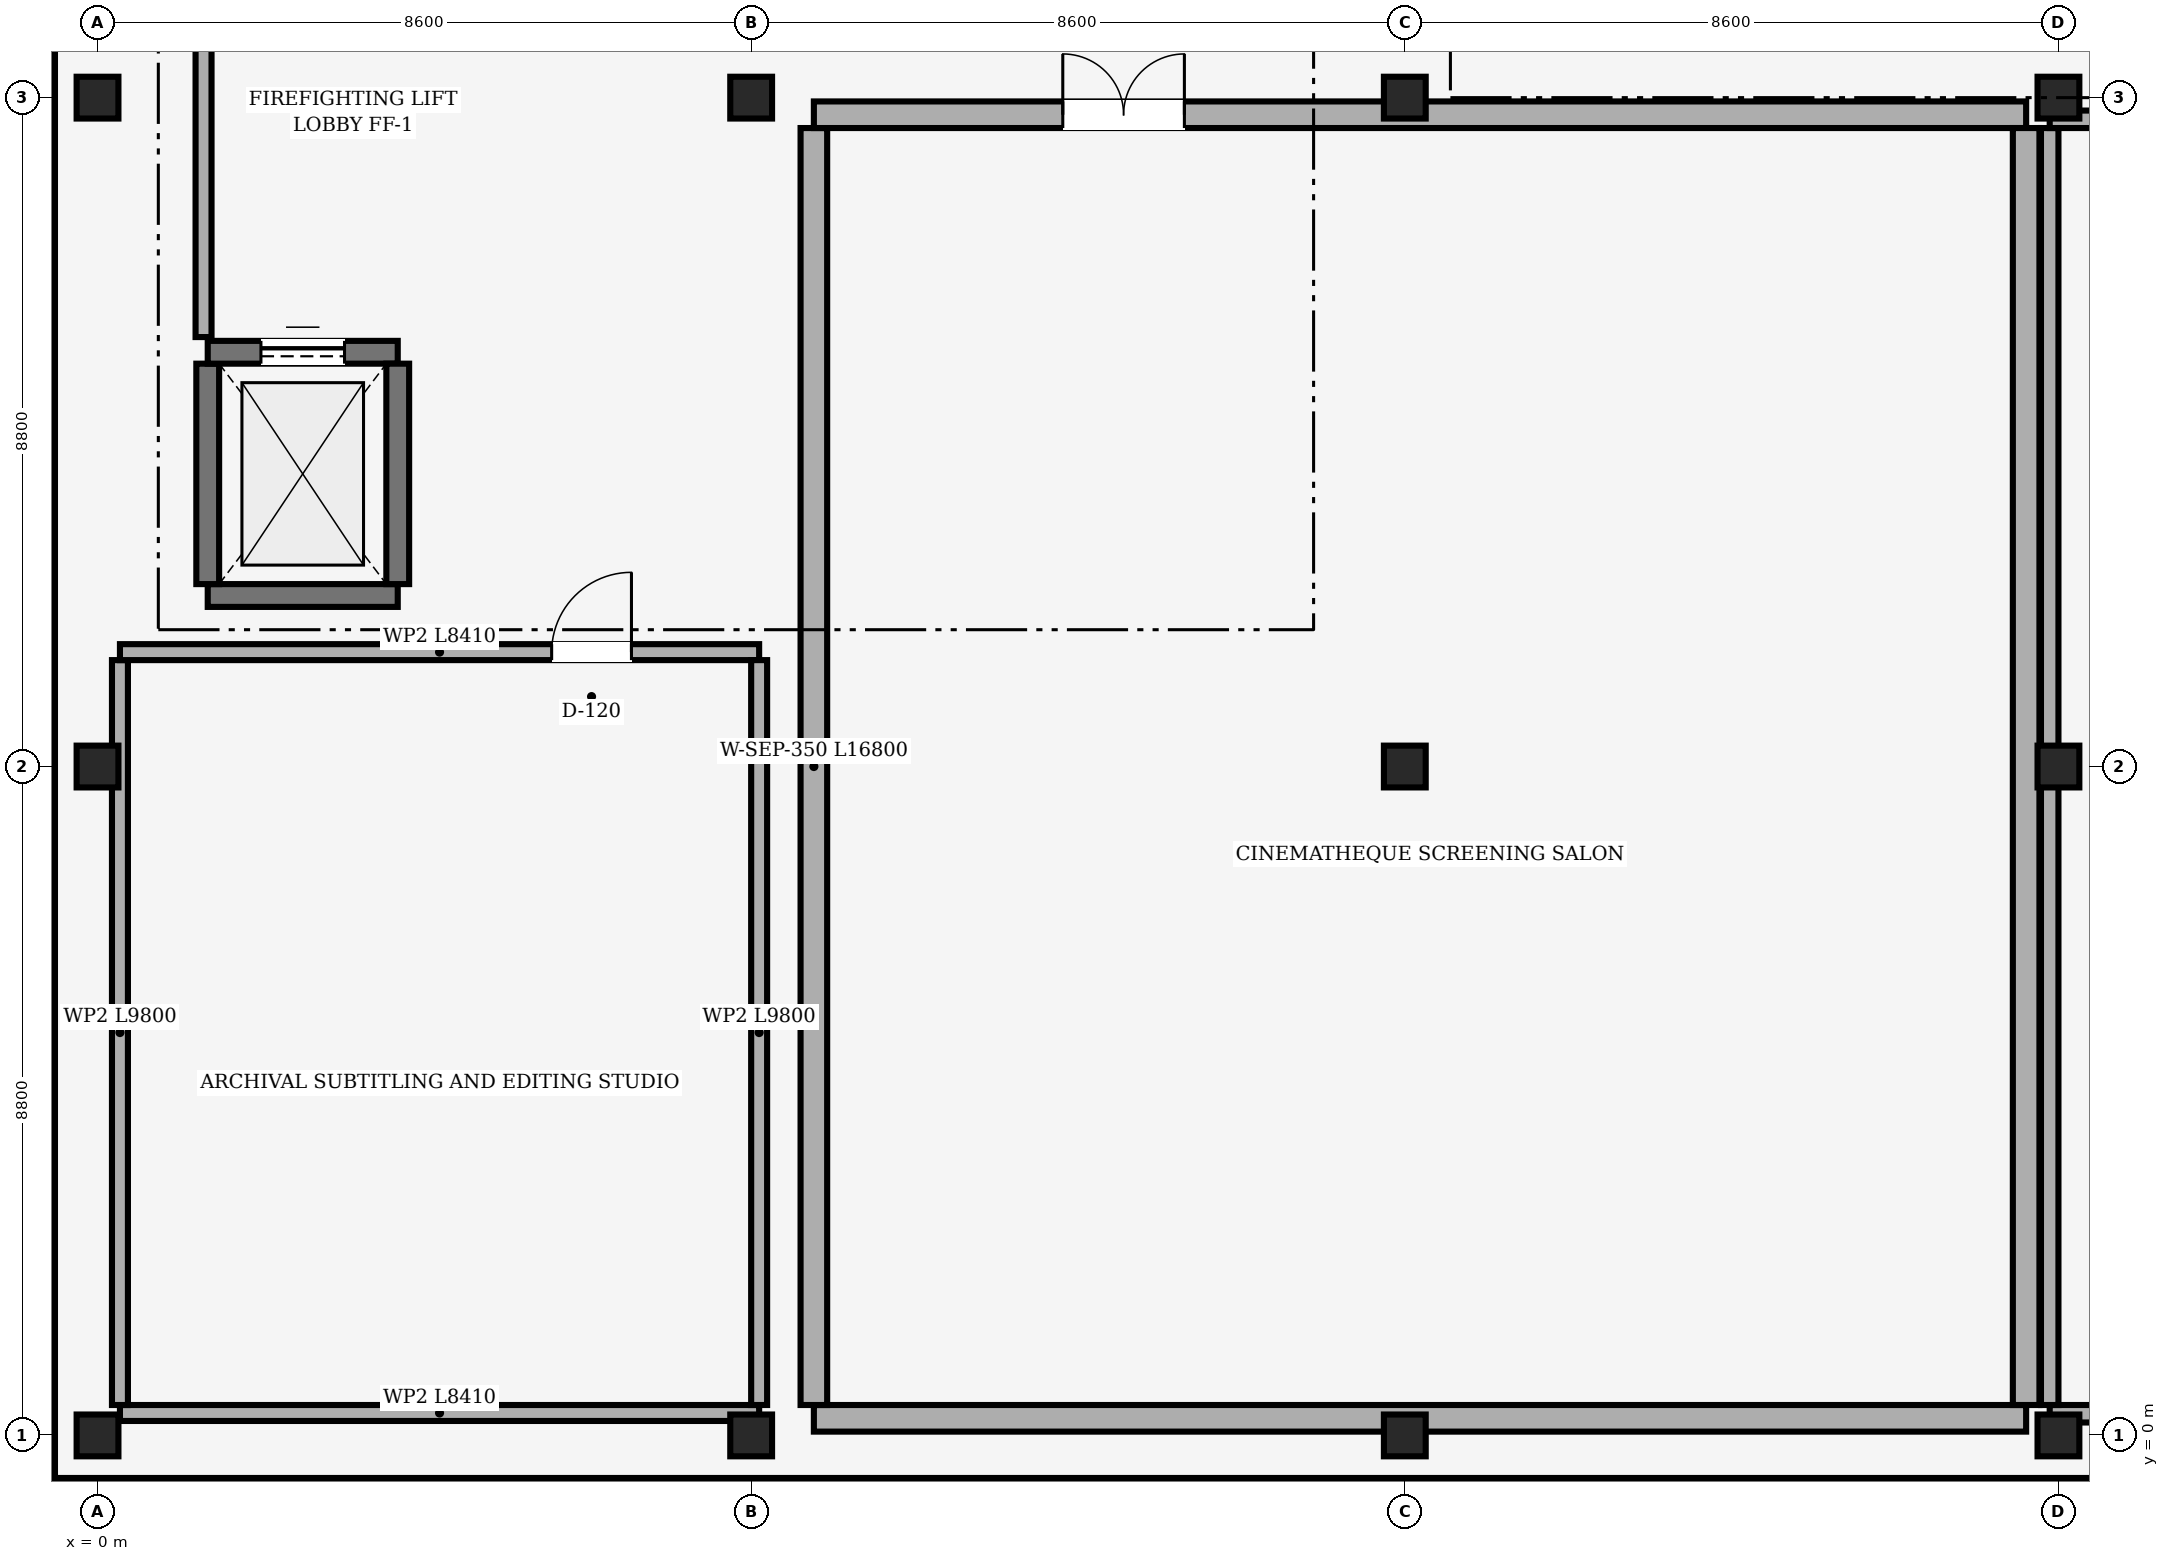
"""IFC4 building model, lengths in metres.
Left out: names, types, materials, properties, quantities, classifications, styles, units other than length and angle.
Written with IfcOpenShell. Run it as: python <this file> out.ifc"""

import sys

from ifc_helpers import new_model, si_unit, direction, frame, frame_2d, origin, origin_2d, place, context, subcontext, project, spatial, rectangle, extrude, element, fill, save


model = new_model("IFC4")
c1 = context("Model", 3, precision=1e-05, world=origin(), true_north=direction((0.0, 1.0)))
c2 = subcontext(c1, "Body", "Model", "MODEL_VIEW")
j1 = project(units=[si_unit("LENGTHUNIT", "METRE"), si_unit("PLANEANGLEUNIT", "RADIAN")], contexts=[c1])
p1 = place(None, origin())
s1 = spatial("IfcSite", under=j1, at=p1, CompositionType="ELEMENT")
p2 = place(p1, origin())
s2 = spatial("IfcBuilding", under=s1, at=p2, CompositionType="ELEMENT")
p3 = place(p2, frame((0.0, 0.0, 25.5)))
s3 = spatial("IfcBuildingStorey", under=s2, at=p3, CompositionType="ELEMENT", Elevation=25.5)
for number, where, z_axis, x_axis in (
    (1, (0.0, 0.0, 0.0), (0.0, 0.0, 1.0), (1.0, 0.0, 0.0)),
    (2, (0.0, 8.8, 0.0), (0.0, 0.0, 1.0), (1.0, 0.0, 0.0)),
    (3, (0.0, 17.6, 0.0), (0.0, 0.0, 1.0), (1.0, 0.0, 0.0)),
    (4, (8.6, 0.0, 0.0), (0.0, 0.0, 1.0), (1.0, 0.0, 0.0)),
    (5, (8.6, 17.6, 0.0), (0.0, 0.0, 1.0), (1.0, 0.0, 0.0)),
    (6, (17.2, 0.0, 0.0), (0.0, 0.0, 1.0), (1.0, 0.0, 0.0)),
    (7, (17.2, 8.8, 0.0), (0.0, 0.0, 1.0), (1.0, 0.0, 0.0)),
    (8, (17.2, 17.6, 0.0), (0.0, 0.0, 1.0), (1.0, 0.0, 0.0)),
    (9, (25.8, 0.0, 0.0), (0.0, 0.0, 1.0), (1.0, 0.0, 0.0)),
    (10, (25.8, 8.8, 0.0), (0.0, 0.0, 1.0), (1.0, 0.0, 0.0)),
    (11, (25.8, 17.6, 0.0), (0.0, 0.0, 1.0), (1.0, 0.0, 0.0)),
):
    element("IfcColumn", number, at=place(p3, frame(where, z_axis=z_axis, x_axis=x_axis)), inside=s3, PredefinedType="COLUMN", context=c2, shape_type="SweptSolid", body=[
        extrude(rectangle(XDim=0.55, YDim=0.55, at=origin_2d()), origin(), (0.0, 0.0, 1.0), 2.91),
    ])
p4 = place(p3, frame((33.9, -0.74, 0.0), z_axis=(0.0, 0.0, 1.0), x_axis=(-1.0, 0.0, 0.0)))
e12 = element("IfcWall", 12, at=p4, inside=s3, PredefinedType="SOLIDWALL", context=c2, shape_type="SweptSolid", body=[
    extrude(rectangle(XDim=34.64, YDim=0.36, at=frame_2d((17.32, 0.0))), origin(), (0.0, 0.0, 1.0), 2.91),
])
p5 = place(p4, frame((16.28, 0.0, 0.36)))
e13 = element("IfcOpeningElement", 13, at=p5, cuts=e12, PredefinedType="OPENING", context=c2, shape_type="SweptSolid", body=[
    extrude(rectangle(XDim=0.28, YDim=0.28, at=frame_2d((0.14, 0.14))), frame((0.0, 0.18, 0.0), z_axis=(0.0, -1.0, 0.0), x_axis=(1.0, 0.0, 0.0)), (0.0, 0.0, 1.0), 0.36),
])
p6 = place(p4, frame((17.18, 0.0, 0.36)))
e14 = element("IfcOpeningElement", 14, at=p6, cuts=e12, PredefinedType="OPENING", context=c2, shape_type="SweptSolid", body=[
    extrude(rectangle(XDim=0.28, YDim=0.28, at=frame_2d((0.14, 0.14))), frame((0.0, 0.18, 0.0), z_axis=(0.0, -1.0, 0.0), x_axis=(1.0, 0.0, 0.0)), (0.0, 0.0, 1.0), 0.36),
])
p7 = place(p4, frame((19.88, 0.0, 0.36)))
e15 = element("IfcOpeningElement", 15, at=p7, cuts=e12, PredefinedType="OPENING", context=c2, shape_type="SweptSolid", body=[
    extrude(rectangle(XDim=0.28, YDim=0.28, at=frame_2d((0.14, 0.14))), frame((0.0, 0.18, 0.0), z_axis=(0.0, -1.0, 0.0), x_axis=(1.0, 0.0, 0.0)), (0.0, 0.0, 1.0), 0.36),
])
p8 = place(p3, frame((-0.74, -0.74, 0.0), z_axis=(0.0, 0.0, 1.0), x_axis=(0.0, 1.0, 0.0)))
e16 = element("IfcWall", 16, at=p8, inside=s3, PredefinedType="SOLIDWALL", context=c2, shape_type="SweptSolid", body=[
    extrude(rectangle(XDim=36.68, YDim=0.36, at=frame_2d((18.34, 0.0))), origin(), (0.0, 0.0, 1.0), 2.91),
])
p9 = place(p8, frame((16.4, 0.0, 0.36)))
e17 = element("IfcOpeningElement", 17, at=p9, cuts=e16, PredefinedType="OPENING", context=c2, shape_type="SweptSolid", body=[
    extrude(rectangle(XDim=0.28, YDim=0.28, at=frame_2d((0.14, 0.14))), frame((0.0, 0.18, 0.0), z_axis=(0.0, -1.0, 0.0), x_axis=(1.0, 0.0, 0.0)), (0.0, 0.0, 1.0), 0.36),
])
p10 = place(p8, frame((17.3, 0.0, 0.36)))
e18 = element("IfcOpeningElement", 18, at=p10, cuts=e16, PredefinedType="OPENING", context=c2, shape_type="SweptSolid", body=[
    extrude(rectangle(XDim=0.28, YDim=0.28, at=frame_2d((0.14, 0.14))), frame((0.0, 0.18, 0.0), z_axis=(0.0, -1.0, 0.0), x_axis=(1.0, 0.0, 0.0)), (0.0, 0.0, 1.0), 0.36),
])
p11 = place(p8, frame((20.0, 0.0, 0.36)))
e19 = element("IfcOpeningElement", 19, at=p11, cuts=e16, PredefinedType="OPENING", context=c2, shape_type="SweptSolid", body=[
    extrude(rectangle(XDim=0.28, YDim=0.28, at=frame_2d((0.14, 0.14))), frame((0.0, 0.18, 0.0), z_axis=(0.0, -1.0, 0.0), x_axis=(1.0, 0.0, 0.0)), (0.0, 0.0, 1.0), 0.36),
])
p12 = place(p3, frame((3.95, 11.05, 0.0), z_axis=(0.0, 0.0, 1.0), x_axis=(-1.0, 0.0, 0.0)))
e20 = element("IfcWall", 20, at=p12, inside=s3, PredefinedType="SHEAR", context=c2, shape_type="SweptSolid", body=[
    extrude(rectangle(XDim=2.5, YDim=0.3, at=frame_2d((1.25, 0.0))), origin(), (0.0, 0.0, 1.0), 2.91),
])
p13 = place(p3, frame((1.45, 11.2, 0.0), z_axis=(0.0, 0.0, 1.0), x_axis=(0.0, 1.0, 0.0)))
e21 = element("IfcWall", 21, at=p13, inside=s3, PredefinedType="SHEAR", context=c2, shape_type="SweptSolid", body=[
    extrude(rectangle(XDim=2.9, YDim=0.3, at=frame_2d((1.45, 0.0))), origin(), (0.0, 0.0, 1.0), 2.91),
])
p14 = place(p3, frame((1.45, 14.25, 0.0), z_axis=(0.0, 0.0, 1.0), x_axis=(1.0, 0.0, 0.0)))
e22 = element("IfcWall", 22, at=p14, inside=s3, PredefinedType="SHEAR", context=c2, shape_type="SweptSolid", body=[
    extrude(rectangle(XDim=2.5, YDim=0.3, at=frame_2d((1.25, 0.0))), origin(), (0.0, 0.0, 1.0), 2.91),
])
p15 = place(p14, frame((0.7, 0.0, 0.0)))
e23 = element("IfcOpeningElement", 23, at=p15, cuts=e22, PredefinedType="OPENING", context=c2, shape_type="SweptSolid", body=[
    extrude(rectangle(XDim=1.1, YDim=2.1, at=frame_2d((0.55, 1.05))), frame((0.0, 0.15, 0.0), z_axis=(0.0, -1.0, 0.0), x_axis=(1.0, 0.0, 0.0)), (0.0, 0.0, 1.0), 0.3),
])
p16 = place(p3, frame((3.95, 14.1, 0.0), z_axis=(0.0, 0.0, 1.0), x_axis=(0.0, -1.0, 0.0)))
e24 = element("IfcWall", 24, at=p16, inside=s3, PredefinedType="SHEAR", context=c2, shape_type="SweptSolid", body=[
    extrude(rectangle(XDim=2.9, YDim=0.3, at=frame_2d((1.45, 0.0))), origin(), (0.0, 0.0, 1.0), 2.91),
])
p17 = place(p3, frame((1.395, 14.45, 0.0), z_axis=(0.0, 0.0, 1.0), x_axis=(0.0, 1.0, 0.0)))
e25 = element("IfcWall", 25, at=p17, inside=s3, PredefinedType="PARTITIONING", context=c2, shape_type="SweptSolid", body=[
    extrude(rectangle(XDim=8.35, YDim=0.21, at=frame_2d((4.175, 0.0))), origin(), (0.0, 0.0, 1.0), 2.89),
])
p18 = place(p3, frame((25.375, 0.225, 0.0), z_axis=(0.0, 0.0, 1.0), x_axis=(-1.0, 0.0, 0.0)))
e26 = element("IfcWall", 26, at=p18, inside=s3, PredefinedType="SOLIDWALL", context=c2, shape_type="SweptSolid", body=[
    extrude(rectangle(XDim=15.95, YDim=0.35, at=frame_2d((7.975, 0.0))), origin(), (0.0, 0.0, 1.0), 2.3),
])
p19 = place(p3, frame((9.425, 0.4, 0.0), z_axis=(0.0, 0.0, 1.0), x_axis=(0.0, 1.0, 0.0)))
e27 = element("IfcWall", 27, at=p19, inside=s3, PredefinedType="SOLIDWALL", context=c2, shape_type="SweptSolid", body=[
    extrude(rectangle(XDim=16.8, YDim=0.35, at=frame_2d((8.4, 0.0))), origin(), (0.0, 0.0, 1.0), 2.89),
])
p20 = place(p3, frame((9.425, 17.375, 0.0), z_axis=(0.0, 0.0, 1.0), x_axis=(1.0, 0.0, 0.0)))
e28 = element("IfcWall", 28, at=p20, inside=s3, PredefinedType="SOLIDWALL", context=c2, shape_type="SweptSolid", body=[
    extrude(rectangle(XDim=15.95, YDim=0.35, at=frame_2d((7.975, 0.0))), origin(), (0.0, 0.0, 1.0), 2.34),
])
p21 = place(p20, frame((3.275, 0.0, 0.0)))
e29 = element("IfcOpeningElement", 29, at=p21, cuts=e28, PredefinedType="OPENING", context=c2, shape_type="SweptSolid", body=[
    extrude(rectangle(XDim=1.6, YDim=2.2, at=frame_2d((0.8, 1.1))), frame((0.0, 0.175, 0.0), z_axis=(0.0, -1.0, 0.0), x_axis=(1.0, 0.0, 0.0)), (0.0, 0.0, 1.0), 0.35),
])
p22 = place(p3, frame((25.375, 17.2, 0.0), z_axis=(0.0, 0.0, 1.0), x_axis=(0.0, -1.0, 0.0)))
e30 = element("IfcWall", 30, at=p22, inside=s3, PredefinedType="SOLIDWALL", context=c2, shape_type="SweptSolid", body=[
    extrude(rectangle(XDim=16.8, YDim=0.35, at=frame_2d((8.4, 0.0))), origin(), (0.0, 0.0, 1.0), 2.34),
])
p23 = place(p3, frame((33.915, 0.285, 0.0), z_axis=(0.0, 0.0, 1.0), x_axis=(-1.0, 0.0, 0.0)))
e31 = element("IfcWall", 31, at=p23, inside=s3, PredefinedType="PARTITIONING", context=c2, shape_type="SweptSolid", body=[
    extrude(rectangle(XDim=8.23, YDim=0.23, at=frame_2d((4.115, 0.0))), origin(), (0.0, 0.0, 1.0), 2.3),
])
p24 = place(p3, frame((25.685, 0.4, 0.0), z_axis=(0.0, 0.0, 1.0), x_axis=(0.0, 1.0, 0.0)))
e32 = element("IfcWall", 32, at=p24, inside=s3, PredefinedType="PARTITIONING", context=c2, shape_type="SweptSolid", body=[
    extrude(rectangle(XDim=16.8, YDim=0.23, at=frame_2d((8.4, 0.0))), origin(), (0.0, 0.0, 1.0), 2.34),
])
p25 = place(p3, frame((25.685, 17.315, 0.0), z_axis=(0.0, 0.0, 1.0), x_axis=(1.0, 0.0, 0.0)))
e33 = element("IfcWall", 33, at=p25, inside=s3, PredefinedType="PARTITIONING", context=c2, shape_type="SweptSolid", body=[
    extrude(rectangle(XDim=8.23, YDim=0.23, at=frame_2d((4.115, 0.0))), origin(), (0.0, 0.0, 1.0), 2.34),
])
p26 = place(p25, frame((3.515, 0.0, 0.0)))
e34 = element("IfcOpeningElement", 34, at=p26, cuts=e33, PredefinedType="OPENING", context=c2, shape_type="SweptSolid", body=[
    extrude(rectangle(XDim=1.2, YDim=2.15, at=frame_2d((0.6, 1.075))), frame((0.0, 0.115, 0.0), z_axis=(0.0, -1.0, 0.0), x_axis=(1.0, 0.0, 0.0)), (0.0, 0.0, 1.0), 0.23),
])
p27 = place(p3, frame((8.705, 0.295, 0.0), z_axis=(0.0, 0.0, 1.0), x_axis=(-1.0, 0.0, 0.0)))
e35 = element("IfcWall", 35, at=p27, inside=s3, PredefinedType="PARTITIONING", context=c2, shape_type="SweptSolid", body=[
    extrude(rectangle(XDim=8.41, YDim=0.21, at=frame_2d((4.205, 0.0))), origin(), (0.0, 0.0, 1.0), 2.3),
])
p28 = place(p3, frame((0.295, 0.4, 0.0), z_axis=(0.0, 0.0, 1.0), x_axis=(0.0, 1.0, 0.0)))
e36 = element("IfcWall", 36, at=p28, inside=s3, PredefinedType="PARTITIONING", context=c2, shape_type="SweptSolid", body=[
    extrude(rectangle(XDim=9.8, YDim=0.21, at=frame_2d((4.9, 0.0))), origin(), (0.0, 0.0, 1.0), 2.3),
])
p29 = place(p3, frame((0.295, 10.305, 0.0), z_axis=(0.0, 0.0, 1.0), x_axis=(1.0, 0.0, 0.0)))
e37 = element("IfcWall", 37, at=p29, inside=s3, PredefinedType="PARTITIONING", context=c2, shape_type="SweptSolid", body=[
    extrude(rectangle(XDim=8.41, YDim=0.21, at=frame_2d((4.205, 0.0))), origin(), (0.0, 0.0, 1.0), 2.89),
])
p30 = place(p29, frame((5.68, 0.0, 0.0)))
e38 = element("IfcOpeningElement", 38, at=p30, cuts=e37, PredefinedType="OPENING", context=c2, shape_type="SweptSolid", body=[
    extrude(rectangle(XDim=1.05, YDim=2.1, at=frame_2d((0.525, 1.05))), frame((0.0, 0.105, 0.0), z_axis=(0.0, -1.0, 0.0), x_axis=(1.0, 0.0, 0.0)), (0.0, 0.0, 1.0), 0.21),
])
p31 = place(p3, frame((8.705, 10.2, 0.0), z_axis=(0.0, 0.0, 1.0), x_axis=(0.0, -1.0, 0.0)))
e39 = element("IfcWall", 39, at=p31, inside=s3, PredefinedType="PARTITIONING", context=c2, shape_type="SweptSolid", body=[
    extrude(rectangle(XDim=9.8, YDim=0.21, at=frame_2d((4.9, 0.0))), origin(), (0.0, 0.0, 1.0), 2.34),
])
p32 = place(p15, origin())
e40 = element("IfcDoor", 40, at=p32, inside=s3, OperationType="SLIDING_TO_LEFT", PredefinedType="DOOR", context=c2, shape_type="SweptSolid", body=[
    extrude(rectangle(XDim=1.1, YDim=2.1, at=frame_2d((0.55, 1.05))), frame((0.0, 0.025, 0.0), z_axis=(0.0, -1.0, 0.0), x_axis=(1.0, 0.0, 0.0)), (0.0, 0.0, 1.0), 0.05),
])
fill(e23, e40)
p33 = place(p21, origin())
e41 = element("IfcDoor", 41, at=p33, inside=s3, OperationType="DOUBLE_DOOR_SINGLE_SWING", PredefinedType="DOOR", context=c2, shape_type="SweptSolid", body=[
    extrude(rectangle(XDim=1.6, YDim=2.2, at=frame_2d((0.8, 1.1))), frame((0.0, 0.025, 0.0), z_axis=(0.0, -1.0, 0.0), x_axis=(1.0, 0.0, 0.0)), (0.0, 0.0, 1.0), 0.05),
])
fill(e29, e41)
p34 = place(p30, origin())
e42 = element("IfcDoor", 42, at=p34, inside=s3, OperationType="SINGLE_SWING_RIGHT", PredefinedType="DOOR", context=c2, shape_type="SweptSolid", body=[
    extrude(rectangle(XDim=1.05, YDim=2.1, at=frame_2d((0.525, 1.05))), frame((0.0, 0.025, 0.0), z_axis=(0.0, -1.0, 0.0), x_axis=(1.0, 0.0, 0.0)), (0.0, 0.0, 1.0), 0.05),
])
fill(e38, e42)
save(model, sys.argv[1])
